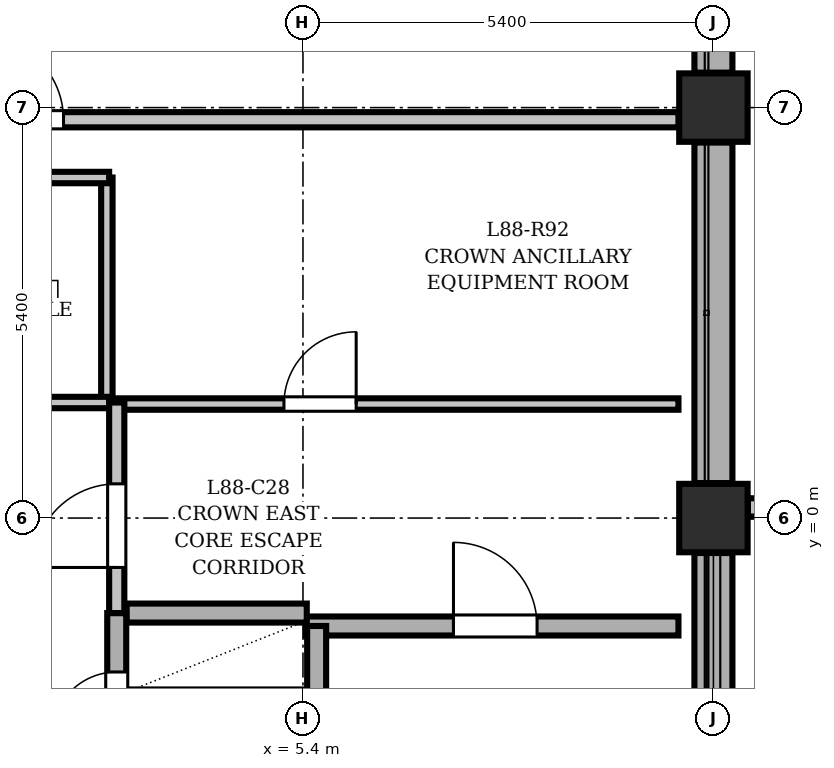
"""IFC4 building model, lengths in metres.
Left out: names, types, materials, properties, quantities, classifications, styles, units other than length and angle.
Written with IfcOpenShell. Run it as: python <this file> out.ifc"""

import sys

from ifc_helpers import new_model, si_unit, direction, frame, frame_2d, origin, origin_2d, place, context, subcontext, project, spatial, rectangle, extrude, element, fill, save


model = new_model("IFC4")
c1 = context("Model", 3, precision=1e-05, world=origin(), true_north=direction((0.0, 1.0)))
c2 = subcontext(c1, "Body", "Model", "MODEL_VIEW")
j1 = project(units=[si_unit("LENGTHUNIT", "METRE"), si_unit("PLANEANGLEUNIT", "RADIAN")], contexts=[c1])
p1 = place(None, origin())
s1 = spatial("IfcSite", under=j1, at=p1, CompositionType="ELEMENT")
p2 = place(p1, origin())
s2 = spatial("IfcBuilding", under=s1, at=p2, CompositionType="ELEMENT")
p3 = place(p2, frame((0.0, 0.0, 337.5)))
s3 = spatial("IfcBuildingStorey", under=s2, at=p3, CompositionType="ELEMENT", Elevation=337.5)
for number, where, z_axis, x_axis in (
    (1, (10.8, 0.0, 0.0), (0.0, 0.0, 1.0), (1.0, 0.0, 0.0)),
    (2, (10.8, 5.4, 0.0), (0.0, 0.0, 1.0), (1.0, 0.0, 0.0)),
):
    element("IfcColumn", number, at=place(p3, frame(where, z_axis=z_axis, x_axis=x_axis)), inside=s3, PredefinedType="COLUMN", context=c2, shape_type="SweptSolid", body=[
        extrude(rectangle(XDim=0.9, YDim=0.9, at=origin_2d()), origin(), (0.0, 0.0, 1.0), 4.5),
    ])
for number, where, z_axis, x_axis in (
    (3, (10.8, -4.94, 0.0), (0.0, 0.0, 1.0), (0.0, 1.0, 0.0)),
    (4, (10.8, 0.46, 0.0), (0.0, 0.0, 1.0), (0.0, 1.0, 0.0)),
    (5, (10.8, 5.86, 0.0), (0.0, 0.0, 1.0), (0.0, 1.0, 0.0)),
):
    element("IfcWall", number, at=place(p3, frame(where, z_axis=z_axis, x_axis=x_axis)), inside=s3, PredefinedType="SHEAR", context=c2, shape_type="SweptSolid", body=[
        extrude(rectangle(XDim=4.48, YDim=0.5, at=frame_2d((2.24, 0.0))), origin(), (0.0, 0.0, 1.0), 4.5),
    ])
p4 = place(p3, frame((11.254, 0.14, 0.0), z_axis=(0.0, 0.0, 1.0), x_axis=(1.0, 0.0, 0.0)))
e6 = element("IfcWall", 6, at=p4, inside=s3, PredefinedType="STANDARD", context=c2, shape_type="SweptSolid", body=[
    extrude(rectangle(XDim=0.606, YDim=0.24, at=frame_2d((0.303, 0.0))), origin(), (0.0, 0.0, 1.0), 3.507),
])
p5 = place(p3, frame((5.44, -1.42, 0.0), z_axis=(0.0, 0.0, 1.0), x_axis=(1.0, 0.0, 0.0)))
e7 = element("IfcWall", 7, at=p5, inside=s3, PredefinedType="SHEAR", context=c2, shape_type="SweptSolid", body=[
    extrude(rectangle(XDim=4.9, YDim=0.25, at=frame_2d((2.45, 0.0))), origin(), (0.0, 0.0, 1.0), 4.5),
])
p6 = place(p5, frame((1.94, 0.0, 0.0)))
e8 = element("IfcOpeningElement", 8, at=p6, cuts=e7, PredefinedType="OPENING", context=c2, shape_type="SweptSolid", body=[
    extrude(rectangle(XDim=1.1, YDim=2.1, at=frame_2d((0.55, 1.05))), frame((0.0, 0.135, 0.0), z_axis=(0.0, -1.0, 0.0), x_axis=(1.0, 0.0, 0.0)), (0.0, 0.0, 1.0), 0.27),
])
p7 = place(p3, frame((5.58, -6.51, 0.0), z_axis=(0.0, 0.0, 1.0), x_axis=(0.0, 1.0, 0.0)))
e9 = element("IfcWall", 9, at=p7, inside=s3, PredefinedType="SHEAR", context=c2, shape_type="SweptSolid", body=[
    extrude(rectangle(XDim=5.09, YDim=0.25, at=frame_2d((2.545, 0.0))), origin(), (0.0, 0.0, 1.0), 4.5),
])
p8 = place(p7, frame((0.85, 0.0, 0.0)))
e10 = element("IfcOpeningElement", 10, at=p8, cuts=e9, PredefinedType="OPENING", context=c2, shape_type="SweptSolid", body=[
    extrude(rectangle(XDim=1.1, YDim=2.1, at=frame_2d((0.55, 1.05))), frame((0.0, 0.135, 0.0), z_axis=(0.0, -1.0, 0.0), x_axis=(1.0, 0.0, 0.0)), (0.0, 0.0, 1.0), 0.27),
])
p9 = place(p3, frame((3.08, -1.25, 0.0), z_axis=(0.0, 0.0, 1.0), x_axis=(1.0, 0.0, 0.0)))
e11 = element("IfcWall", 11, at=p9, inside=s3, PredefinedType="SHEAR", context=c2, shape_type="SweptSolid", body=[
    extrude(rectangle(XDim=2.37, YDim=0.25, at=frame_2d((1.185, 0.0))), origin(), (0.0, 0.0, 1.0), 4.5),
])
p10 = place(p3, frame((2.95, -3.65, 0.0), z_axis=(0.0, 0.0, 1.0), x_axis=(0.0, 1.0, 0.0)))
e12 = element("IfcWall", 12, at=p10, inside=s3, PredefinedType="SHEAR", context=c2, shape_type="SweptSolid", body=[
    extrude(rectangle(XDim=2.4, YDim=0.25, at=frame_2d((1.2, 0.0))), origin(), (0.0, 0.0, 1.0), 4.5),
])
p11 = place(p10, frame((0.775, 0.0, 0.0)))
e13 = element("IfcOpeningElement", 13, at=p11, cuts=e12, PredefinedType="OPENING", context=c2, shape_type="SweptSolid", body=[
    extrude(rectangle(XDim=0.85, YDim=2.1, at=frame_2d((0.425, 1.05))), frame((0.0, 0.135, 0.0), z_axis=(0.0, -1.0, 0.0), x_axis=(1.0, 0.0, 0.0)), (0.0, 0.0, 1.0), 0.27),
])
p12 = place(p3, frame((2.82, 1.52, 0.0), z_axis=(0.0, 0.0, 1.0), x_axis=(0.0, 1.0, 0.0)))
e14 = element("IfcWall", 14, at=p12, inside=s3, PredefinedType="PARTITIONING", context=c2, shape_type="SweptSolid", body=[
    extrude(rectangle(XDim=2.96, YDim=0.15, at=frame_2d((1.48, 0.0))), origin(), (0.0, 0.0, 1.0), 4.22),
])
for number, where, z_axis, x_axis in (
    (15, (0.18, 4.48, 0.0), (0.0, 0.0, 1.0), (1.0, 0.0, 0.0)),
    (16, (0.18, 1.52, 0.0), (0.0, 0.0, 1.0), (1.0, 0.0, 0.0)),
):
    element("IfcWall", number, at=place(p3, frame(where, z_axis=z_axis, x_axis=x_axis)), inside=s3, PredefinedType="PARTITIONING", context=c2, shape_type="SweptSolid", body=[
        extrude(rectangle(XDim=2.67, YDim=0.15, at=frame_2d((1.335, 0.0))), origin(), (0.0, 0.0, 1.0), 4.22),
    ])
p13 = place(p3, frame((2.95, 1.5, 0.0), z_axis=(0.0, 0.0, 1.0), x_axis=(1.0, 0.0, 0.0)))
e17 = element("IfcWall", 17, at=p13, inside=s3, PredefinedType="PARTITIONING", context=c2, shape_type="SweptSolid", body=[
    extrude(rectangle(XDim=7.39, YDim=0.15, at=frame_2d((3.695, 0.0))), origin(), (0.0, 0.0, 1.0), 4.22),
])
p14 = place(p13, frame((2.2, 0.0, 0.0)))
e18 = element("IfcOpeningElement", 18, at=p14, cuts=e17, PredefinedType="OPENING", context=c2, shape_type="SweptSolid", body=[
    extrude(rectangle(XDim=0.95, YDim=2.1, at=frame_2d((0.475, 1.05))), frame((0.0, 0.085, 0.0), z_axis=(0.0, -1.0, 0.0), x_axis=(1.0, 0.0, 0.0)), (0.0, 0.0, 1.0), 0.17),
])
p15 = place(p3, frame((0.35, 5.24, 0.0), z_axis=(0.0, 0.0, 1.0), x_axis=(1.0, 0.0, 0.0)))
e19 = element("IfcWall", 19, at=p15, inside=s3, PredefinedType="PARTITIONING", context=c2, shape_type="SweptSolid", body=[
    extrude(rectangle(XDim=9.99, YDim=0.2, at=frame_2d((4.995, 0.0))), origin(), (0.0, 0.0, 1.0), 4.22),
])
p16 = place(p15, frame((0.8, 0.0, 0.0)))
e20 = element("IfcOpeningElement", 20, at=p16, cuts=e19, PredefinedType="OPENING", context=c2, shape_type="SweptSolid", body=[
    extrude(rectangle(XDim=1.1, YDim=2.1, at=frame_2d((0.55, 1.05))), frame((0.0, 0.11, 0.0), z_axis=(0.0, -1.0, 0.0), x_axis=(1.0, 0.0, 0.0)), (0.0, 0.0, 1.0), 0.22),
])
p17 = place(p3, frame((2.95, -1.25, 0.0), z_axis=(0.0, 0.0, 1.0), x_axis=(0.0, 1.0, 0.0)))
e21 = element("IfcWall", 21, at=p17, inside=s3, PredefinedType="PARTITIONING", context=c2, shape_type="SweptSolid", body=[
    extrude(rectangle(XDim=2.77, YDim=0.2, at=frame_2d((1.385, 0.0))), origin(), (0.0, 0.0, 1.0), 4.22),
])
p18 = place(p17, frame((0.6, 0.0, 0.0)))
e22 = element("IfcOpeningElement", 22, at=p18, cuts=e21, PredefinedType="OPENING", context=c2, shape_type="SweptSolid", body=[
    extrude(rectangle(XDim=1.1, YDim=2.1, at=frame_2d((0.55, 1.05))), frame((0.0, 0.11, 0.0), z_axis=(0.0, -1.0, 0.0), x_axis=(1.0, 0.0, 0.0)), (0.0, 0.0, 1.0), 0.22),
])
p19 = place(p11, origin())
e23 = element("IfcDoor", 23, at=p19, inside=s3, OperationType="SINGLE_SWING_LEFT", PredefinedType="DOOR", context=c2, shape_type="SweptSolid", body=[
    extrude(rectangle(XDim=0.85, YDim=2.1, at=frame_2d((0.425, 1.05))), frame((0.0, 0.025, 0.0), z_axis=(0.0, -1.0, 0.0), x_axis=(1.0, 0.0, 0.0)), (0.0, 0.0, 1.0), 0.05),
])
fill(e13, e23)
p20 = place(p6, origin())
e24 = element("IfcDoor", 24, at=p20, inside=s3, OperationType="SINGLE_SWING_LEFT", PredefinedType="DOOR", context=c2, shape_type="SweptSolid", body=[
    extrude(rectangle(XDim=1.1, YDim=2.1, at=frame_2d((0.55, 1.05))), frame((0.0, 0.025, 0.0), z_axis=(0.0, -1.0, 0.0), x_axis=(1.0, 0.0, 0.0)), (0.0, 0.0, 1.0), 0.05),
])
fill(e8, e24)
p21 = place(p16, origin())
e25 = element("IfcDoor", 25, at=p21, inside=s3, OperationType="SINGLE_SWING_LEFT", PredefinedType="DOOR", context=c2, shape_type="SweptSolid", body=[
    extrude(rectangle(XDim=1.1, YDim=2.1, at=frame_2d((0.55, 1.05))), frame((0.0, 0.025, 0.0), z_axis=(0.0, -1.0, 0.0), x_axis=(1.0, 0.0, 0.0)), (0.0, 0.0, 1.0), 0.05),
])
fill(e20, e25)
p22 = place(p18, origin())
e26 = element("IfcDoor", 26, at=p22, inside=s3, OperationType="SINGLE_SWING_LEFT", PredefinedType="DOOR", context=c2, shape_type="SweptSolid", body=[
    extrude(rectangle(XDim=1.1, YDim=2.1, at=frame_2d((0.55, 1.05))), frame((0.0, 0.025, 0.0), z_axis=(0.0, -1.0, 0.0), x_axis=(1.0, 0.0, 0.0)), (0.0, 0.0, 1.0), 0.05),
])
fill(e22, e26)
p23 = place(p14, origin())
e27 = element("IfcDoor", 27, at=p23, inside=s3, OperationType="SINGLE_SWING_RIGHT", PredefinedType="DOOR", context=c2, shape_type="SweptSolid", body=[
    extrude(rectangle(XDim=0.95, YDim=2.1, at=frame_2d((0.475, 1.05))), frame((0.0, 0.025, 0.0), z_axis=(0.0, -1.0, 0.0), x_axis=(1.0, 0.0, 0.0)), (0.0, 0.0, 1.0), 0.05),
])
fill(e18, e27)
save(model, sys.argv[1])
